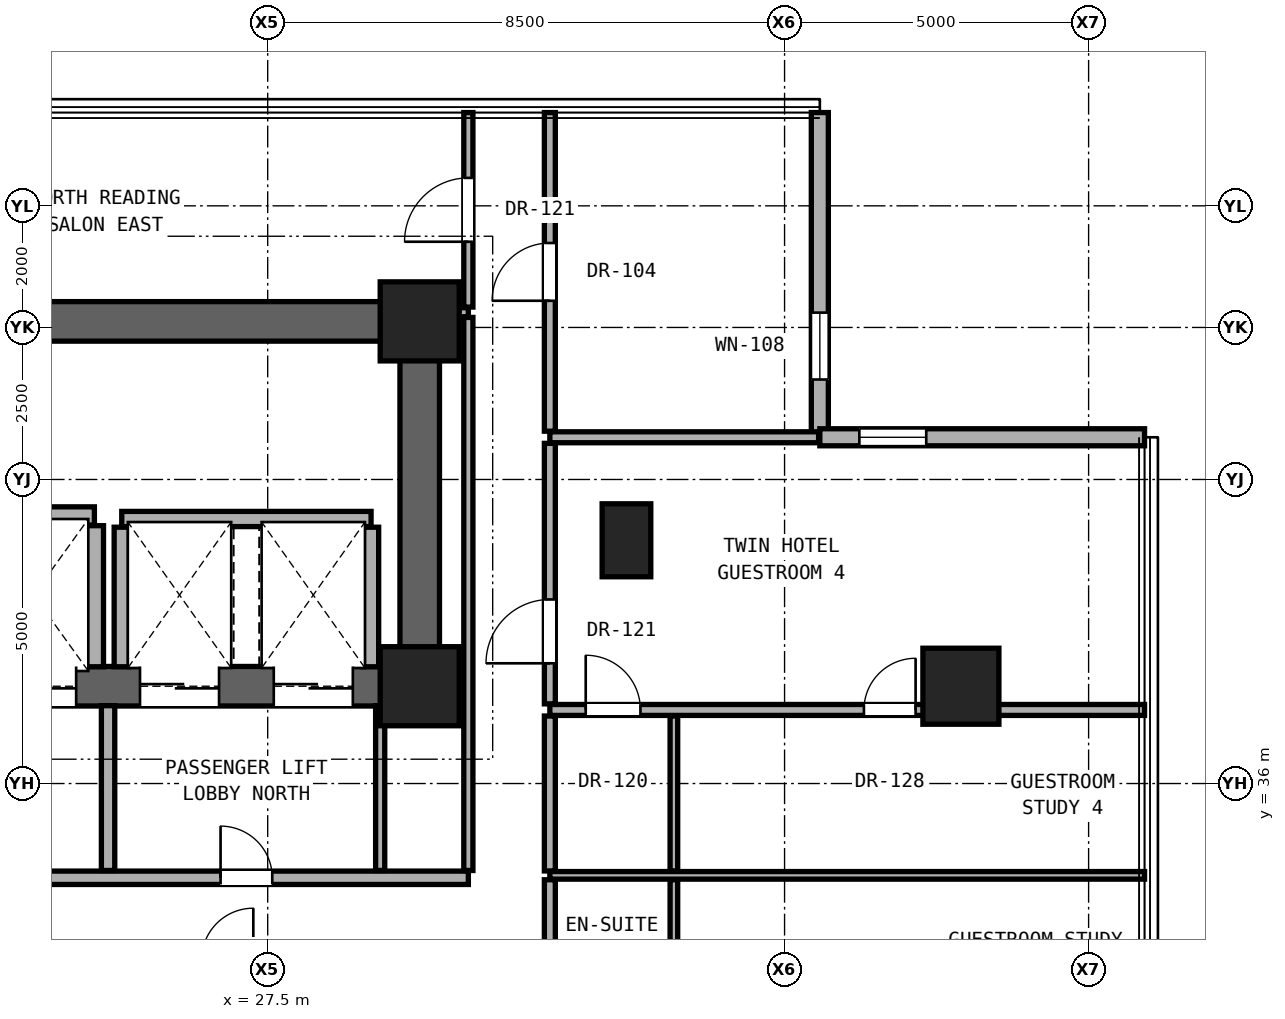
"""IFC4 building model, lengths in metres.
Left out: names, types, materials, properties, quantities, classifications, styles, units other than length and angle.
Written with IfcOpenShell. Run it as: python <this file> out.ifc"""

import sys

from ifc_helpers import new_model, si_unit, direction, frame, frame_2d, origin, origin_2d, place, context, subcontext, project, spatial, rectangle, hollow_rectangle, extrude, element, fill, save


model = new_model("IFC4")
c1 = context("Model", 3, precision=1e-05, world=origin(), true_north=direction((0.0, 1.0)))
c2 = subcontext(c1, "Body", "Model", "MODEL_VIEW")
j1 = project(units=[si_unit("LENGTHUNIT", "METRE"), si_unit("PLANEANGLEUNIT", "RADIAN")], contexts=[c1])
p1 = place(None, origin())
s1 = spatial("IfcSite", under=j1, at=p1, CompositionType="ELEMENT")
p2 = place(p1, origin())
s2 = spatial("IfcBuilding", under=s1, at=p2, CompositionType="ELEMENT")
p3 = place(p2, frame((0.0, 0.0, 62.0)))
s3 = spatial("IfcBuildingStorey", under=s2, at=p3, CompositionType="ELEMENT", Elevation=62.0)
for number, where, z_axis, x_axis in (
    (1, (30.0, 37.6, 0.0), (0.0, 0.0, 1.0), (1.0, 0.0, 0.0)),
    (2, (30.0, 43.6, 0.0), (0.0, 0.0, 1.0), (1.0, 0.0, 0.0)),
):
    element("IfcColumn", number, at=place(p3, frame(where, z_axis=z_axis, x_axis=x_axis)), inside=s3, PredefinedType="COLUMN", context=c2, shape_type="SweptSolid", body=[
        extrude(rectangle(XDim=1.3, YDim=1.3, at=origin_2d()), origin(), (0.0, 0.0, 1.0), 3.3),
    ])
p4 = place(p3, frame((38.9, 37.6, 0.0), z_axis=(0.0, 0.0, 1.0), x_axis=(1.0, 0.0, 0.0)))
e3 = element("IfcColumn", 3, at=p4, inside=s3, PredefinedType="COLUMN", context=c2, shape_type="SweptSolid", body=[
    extrude(hollow_rectangle(XDim=1.25, YDim=1.25, WallThickness=0.07, at=origin_2d()), origin(), (0.0, 0.0, 1.0), 3.3),
])
p5 = place(p3, frame((33.4, 40.0, 0.0), z_axis=(0.0, 0.0, 1.0), x_axis=(1.0, 0.0, 0.0)))
e4 = element("IfcColumn", 4, at=p5, inside=s3, PredefinedType="PILASTER", context=c2, shape_type="SweptSolid", body=[
    extrude(rectangle(XDim=0.8, YDim=1.2, at=origin_2d()), origin(), (0.0, 0.0, 1.0), 3.3),
])
p6 = place(p3, frame((11.0, 43.6, 0.0), z_axis=(0.0, 0.0, 1.0), x_axis=(1.0, 0.0, 0.0)))
e5 = element("IfcWall", 5, at=p6, inside=s3, PredefinedType="SHEAR", context=c2, shape_type="SweptSolid", body=[
    extrude(rectangle(XDim=19.0, YDim=0.65, at=frame_2d((9.5, 0.0))), origin(), (0.0, 0.0, 1.0), 3.06),
])
p7 = place(p3, frame((30.0, 37.6, 0.0), z_axis=(0.0, 0.0, 1.0), x_axis=(0.0, 1.0, 0.0)))
e6 = element("IfcWall", 6, at=p7, inside=s3, PredefinedType="SHEAR", context=c2, shape_type="SweptSolid", body=[
    extrude(rectangle(XDim=6.0, YDim=0.65, at=frame_2d((3.0, 0.0))), origin(), (0.0, 0.0, 1.0), 3.06),
])
p8 = place(p3, frame((11.0, 37.6, 0.0), z_axis=(0.0, 0.0, 1.0), x_axis=(1.0, 0.0, 0.0)))
e7 = element("IfcWall", 7, at=p8, inside=s3, PredefinedType="SHEAR", context=c2, shape_type="SweptSolid", body=[
    extrude(rectangle(XDim=19.0, YDim=0.65, at=frame_2d((9.5, 0.0))), origin(), (0.0, 0.0, 1.0), 3.06),
])
p9 = place(p8, frame((1.06, 0.0, 0.0)))
e8 = element("IfcOpeningElement", 8, at=p9, cuts=e7, PredefinedType="OPENING", context=c2, shape_type="SweptSolid", body=[
    extrude(rectangle(XDim=1.15, YDim=2.2, at=frame_2d((0.575, 1.1))), frame((0.0, 0.335, 0.0), z_axis=(0.0, -1.0, 0.0), x_axis=(1.0, 0.0, 0.0)), (0.0, 0.0, 1.0), 0.67),
])
p10 = place(p8, frame((9.55, 0.0, 0.0)))
e9 = element("IfcOpeningElement", 9, at=p10, cuts=e7, PredefinedType="OPENING", context=c2, shape_type="SweptSolid", body=[
    extrude(rectangle(XDim=1.4, YDim=2.35, at=frame_2d((0.7, 1.175))), frame((0.0, 0.335, 0.0), z_axis=(0.0, -1.0, 0.0), x_axis=(1.0, 0.0, 0.0)), (0.0, 0.0, 1.0), 0.67),
])
p11 = place(p8, frame((11.95, 0.0, 0.0)))
e10 = element("IfcOpeningElement", 10, at=p11, cuts=e7, PredefinedType="OPENING", context=c2, shape_type="SweptSolid", body=[
    extrude(rectangle(XDim=1.4, YDim=2.35, at=frame_2d((0.7, 1.175))), frame((0.0, 0.335, 0.0), z_axis=(0.0, -1.0, 0.0), x_axis=(1.0, 0.0, 0.0)), (0.0, 0.0, 1.0), 0.67),
])
p12 = place(p8, frame((14.4, 0.0, 0.0)))
e11 = element("IfcOpeningElement", 11, at=p12, cuts=e7, PredefinedType="OPENING", context=c2, shape_type="SweptSolid", body=[
    extrude(rectangle(XDim=1.3, YDim=2.3, at=frame_2d((0.65, 1.15))), frame((0.0, 0.335, 0.0), z_axis=(0.0, -1.0, 0.0), x_axis=(1.0, 0.0, 0.0)), (0.0, 0.0, 1.0), 0.67),
])
p13 = place(p8, frame((16.6, 0.0, 0.0)))
e12 = element("IfcOpeningElement", 12, at=p13, cuts=e7, PredefinedType="OPENING", context=c2, shape_type="SweptSolid", body=[
    extrude(rectangle(XDim=1.3, YDim=2.3, at=frame_2d((0.65, 1.15))), frame((0.0, 0.335, 0.0), z_axis=(0.0, -1.0, 0.0), x_axis=(1.0, 0.0, 0.0)), (0.0, 0.0, 1.0), 0.67),
])
p14 = place(p3, frame((36.58, 41.694, 0.0), z_axis=(0.0, 0.0, 1.0), x_axis=(0.0, 1.0, 0.0)))
e13 = element("IfcWall", 13, at=p14, inside=s3, PredefinedType="SOLIDWALL", context=c2, shape_type="SweptSolid", body=[
    extrude(rectangle(XDim=5.34, YDim=0.28, at=frame_2d((2.67, 0.0))), origin(), (0.0, 0.0, 1.0), 3.04),
])
p15 = place(p14, frame((0.95, 0.0, 0.85)))
e14 = element("IfcOpeningElement", 14, at=p15, cuts=e13, PredefinedType="OPENING", context=c2, shape_type="SweptSolid", body=[
    extrude(rectangle(XDim=1.1, YDim=2.0, at=frame_2d((0.55, 1.0))), frame((0.0, 0.15, 0.0), z_axis=(0.0, -1.0, 0.0), x_axis=(1.0, 0.0, 0.0)), (0.0, 0.0, 1.0), 0.3),
])
p16 = place(p3, frame((41.92, 41.694, 0.0), z_axis=(0.0, 0.0, 1.0), x_axis=(-1.0, 0.0, 0.0)))
e15 = element("IfcWall", 15, at=p16, inside=s3, PredefinedType="SOLIDWALL", context=c2, shape_type="SweptSolid", body=[
    extrude(rectangle(XDim=5.34, YDim=0.28, at=frame_2d((2.67, 0.0))), origin(), (0.0, 0.0, 1.0), 3.04),
])
p17 = place(p16, frame((3.59, 0.0, 0.85)))
e16 = element("IfcOpeningElement", 16, at=p17, cuts=e15, PredefinedType="OPENING", context=c2, shape_type="SweptSolid", body=[
    extrude(rectangle(XDim=1.1, YDim=2.0, at=frame_2d((0.55, 1.0))), frame((0.0, 0.15, 0.0), z_axis=(0.0, -1.0, 0.0), x_axis=(1.0, 0.0, 0.0)), (0.0, 0.0, 1.0), 0.3),
])
p18 = place(p3, frame((15.59, 34.45, 0.0), z_axis=(0.0, 0.0, 1.0), x_axis=(1.0, 0.0, 0.0)))
e17 = element("IfcWall", 17, at=p18, inside=s3, PredefinedType="SOLIDWALL", context=c2, shape_type="SweptSolid", body=[
    extrude(rectangle(XDim=15.21, YDim=0.22, at=frame_2d((7.605, 0.0))), origin(), (0.0, 0.0, 1.0), 2.104),
])
p19 = place(p18, frame((6.435, 0.0, 0.0)))
e18 = element("IfcOpeningElement", 18, at=p19, cuts=e17, PredefinedType="OPENING", context=c2, shape_type="SweptSolid", body=[
    extrude(rectangle(XDim=0.85, YDim=2.01, at=frame_2d((0.425, 1.005))), frame((0.0, 0.12, 0.0), z_axis=(0.0, -1.0, 0.0), x_axis=(1.0, 0.0, 0.0)), (0.0, 0.0, 1.0), 0.24),
])
p20 = place(p18, frame((11.135, 0.0, 0.0)))
e19 = element("IfcOpeningElement", 19, at=p20, cuts=e17, PredefinedType="OPENING", context=c2, shape_type="SweptSolid", body=[
    extrude(rectangle(XDim=0.85, YDim=2.01, at=frame_2d((0.425, 1.005))), frame((0.0, 0.12, 0.0), z_axis=(0.0, -1.0, 0.0), x_axis=(1.0, 0.0, 0.0)), (0.0, 0.0, 1.0), 0.24),
])
p21 = place(p18, frame((1.775, 0.0, 0.0)))
e20 = element("IfcOpeningElement", 20, at=p21, cuts=e17, PredefinedType="OPENING", context=c2, shape_type="SweptSolid", body=[
    extrude(rectangle(XDim=0.85, YDim=2.01, at=frame_2d((0.425, 1.005))), frame((0.0, 0.12, 0.0), z_axis=(0.0, -1.0, 0.0), x_axis=(1.0, 0.0, 0.0)), (0.0, 0.0, 1.0), 0.24),
])
p22 = place(p3, frame((32.14, 34.49, 0.0), z_axis=(0.0, 0.0, 1.0), x_axis=(1.0, 0.0, 0.0)))
e21 = element("IfcWall", 21, at=p22, inside=s3, PredefinedType="PARTITIONING", context=c2, shape_type="SweptSolid", body=[
    extrude(rectangle(XDim=9.78, YDim=0.125, at=frame_2d((4.89, 0.0))), origin(), (0.0, 0.0, 1.0), 2.125),
])
p23 = place(p3, frame((32.14, 37.21, 0.0), z_axis=(0.0, 0.0, 1.0), x_axis=(1.0, 0.0, 0.0)))
e22 = element("IfcWall", 22, at=p23, inside=s3, PredefinedType="PARTITIONING", context=c2, shape_type="SweptSolid", body=[
    extrude(rectangle(XDim=9.78, YDim=0.18, at=frame_2d((4.89, 0.0))), origin(), (0.0, 0.0, 1.0), 2.125),
])
p24 = place(p23, frame((5.165, 0.0, 0.0)))
e23 = element("IfcOpeningElement", 23, at=p24, cuts=e22, PredefinedType="OPENING", context=c2, shape_type="SweptSolid", body=[
    extrude(rectangle(XDim=0.85, YDim=2.01, at=frame_2d((0.425, 1.005))), frame((0.0, 0.1, 0.0), z_axis=(0.0, -1.0, 0.0), x_axis=(1.0, 0.0, 0.0)), (0.0, 0.0, 1.0), 0.2),
])
p25 = place(p23, frame((0.59, 0.0, 0.0)))
e24 = element("IfcOpeningElement", 24, at=p25, cuts=e22, PredefinedType="OPENING", context=c2, shape_type="SweptSolid", body=[
    extrude(rectangle(XDim=0.9, YDim=2.1, at=frame_2d((0.45, 1.05))), frame((0.0, 0.1, 0.0), z_axis=(0.0, -1.0, 0.0), x_axis=(1.0, 0.0, 0.0)), (0.0, 0.0, 1.0), 0.2),
])
p26 = place(p3, frame((25.1, 40.35, 0.0), z_axis=(0.0, 0.0, 1.0), x_axis=(1.0, 0.0, 0.0)))
e25 = element("IfcWall", 25, at=p26, inside=s3, PredefinedType="SOLIDWALL", context=c2, shape_type="SweptSolid", body=[
    extrude(rectangle(XDim=4.1, YDim=0.25, at=frame_2d((2.05, 0.0))), origin(), (0.0, 0.0, 1.0), 3.06),
])
p27 = place(p3, frame((20.25, 40.4, 0.0), z_axis=(0.0, 0.0, 1.0), x_axis=(1.0, 0.0, 0.0)))
e26 = element("IfcWall", 26, at=p27, inside=s3, PredefinedType="SOLIDWALL", context=c2, shape_type="SweptSolid", body=[
    extrude(rectangle(XDim=4.4, YDim=0.3, at=frame_2d((2.2, 0.0))), origin(), (0.0, 0.0, 1.0), 3.06),
])
p28 = place(p3, frame((32.14, 41.694, 0.0), z_axis=(0.0, 0.0, 1.0), x_axis=(1.0, 0.0, 0.0)))
e27 = element("IfcWall", 27, at=p28, inside=s3, PredefinedType="PARTITIONING", context=c2, shape_type="SweptSolid", body=[
    extrude(rectangle(XDim=4.42, YDim=0.18, at=frame_2d((2.21, 0.0))), origin(), (0.0, 0.0, 1.0), 3.06),
])
p29 = place(p3, frame((30.32, 43.75, 0.0), z_axis=(0.0, 0.0, 1.0), x_axis=(1.0, 0.0, 0.0)))
e28 = element("IfcWall", 28, at=p29, inside=s3, PredefinedType="PARTITIONING", context=c2, shape_type="SweptSolid", body=[
    extrude(rectangle(XDim=0.48, YDim=0.15, at=frame_2d((0.24, 0.0))), origin(), (0.0, 0.0, 1.0), 3.06),
])
p30 = place(p3, frame((24.65, 37.92, 0.0), z_axis=(0.0, 0.0, 1.0), x_axis=(0.0, 1.0, 0.0)))
e29 = element("IfcWall", 29, at=p30, inside=s3, PredefinedType="SOLIDWALL", context=c2, shape_type="SweptSolid", body=[
    extrude(rectangle(XDim=2.32, YDim=0.3, at=frame_2d((1.16, 0.0))), origin(), (0.0, 0.0, 1.0), 3.06),
])
p31 = place(p3, frame((24.875, 34.57, 0.0), z_axis=(0.0, 0.0, 1.0), x_axis=(0.0, 1.0, 0.0)))
e30 = element("IfcWall", 30, at=p31, inside=s3, PredefinedType="SOLIDWALL", context=c2, shape_type="SweptSolid", body=[
    extrude(rectangle(XDim=2.71, YDim=0.22, at=frame_2d((1.355, 0.0))), origin(), (0.0, 0.0, 1.0), 3.06),
])
p32 = place(p3, frame((25.1, 37.92, 0.0), z_axis=(0.0, 0.0, 1.0), x_axis=(0.0, 1.0, 0.0)))
e31 = element("IfcWall", 31, at=p32, inside=s3, PredefinedType="SOLIDWALL", context=c2, shape_type="SweptSolid", body=[
    extrude(rectangle(XDim=2.295, YDim=0.25, at=frame_2d((1.147, 0.0))), origin(), (0.0, 0.0, 1.0), 3.06),
])
p33 = place(p3, frame((29.35, 34.57, 0.0), z_axis=(0.0, 0.0, 1.0), x_axis=(0.0, 1.0, 0.0)))
e32 = element("IfcWall", 32, at=p33, inside=s3, PredefinedType="PARTITIONING", context=c2, shape_type="SweptSolid", body=[
    extrude(rectangle(XDim=2.71, YDim=0.15, at=frame_2d((1.355, 0.0))), origin(), (0.0, 0.0, 1.0), 3.06),
])
p34 = place(p3, frame((29.2, 37.92, 0.0), z_axis=(0.0, 0.0, 1.0), x_axis=(0.0, 1.0, 0.0)))
e33 = element("IfcWall", 33, at=p34, inside=s3, PredefinedType="SOLIDWALL", context=c2, shape_type="SweptSolid", body=[
    extrude(rectangle(XDim=2.295, YDim=0.25, at=frame_2d((1.147, 0.0))), origin(), (0.0, 0.0, 1.0), 3.06),
])
p35 = place(p3, frame((30.8, 34.57, 0.0), z_axis=(0.0, 0.0, 1.0), x_axis=(0.0, 1.0, 0.0)))
e34 = element("IfcWall", 34, at=p35, inside=s3, PredefinedType="PARTITIONING", context=c2, shape_type="SweptSolid", body=[
    extrude(rectangle(XDim=9.095, YDim=0.15, at=frame_2d((4.547, 0.0))), origin(), (0.0, 0.0, 1.0), 2.436),
])
p36 = place(p3, frame((30.8, 43.835, 0.0), z_axis=(0.0, 0.0, 1.0), x_axis=(0.0, 1.0, 0.0)))
e35 = element("IfcWall", 35, at=p36, inside=s3, PredefinedType="PARTITIONING", context=c2, shape_type="SweptSolid", body=[
    extrude(rectangle(XDim=3.199, YDim=0.15, at=frame_2d((1.6, 0.0))), origin(), (0.0, 0.0, 1.0), 3.06),
])
p37 = place(p36, frame((1.074, 0.0, 0.0)))
e36 = element("IfcOpeningElement", 36, at=p37, cuts=e35, PredefinedType="OPENING", context=c2, shape_type="SweptSolid", body=[
    extrude(rectangle(XDim=1.05, YDim=2.2, at=frame_2d((0.525, 1.1))), frame((0.0, 0.085, 0.0), z_axis=(0.0, -1.0, 0.0), x_axis=(1.0, 0.0, 0.0)), (0.0, 0.0, 1.0), 0.17),
])
p38 = place(p3, frame((32.14, 31.87, 0.0), z_axis=(0.0, 0.0, 1.0), x_axis=(0.0, 1.0, 0.0)))
e37 = element("IfcWall", 37, at=p38, inside=s3, PredefinedType="PARTITIONING", context=c2, shape_type="SweptSolid", body=[
    extrude(rectangle(XDim=2.547, YDim=0.18, at=frame_2d((1.274, 0.0))), origin(), (0.0, 0.0, 1.0), 3.06),
])
p39 = place(p3, frame((32.14, 34.562, 0.0), z_axis=(0.0, 0.0, 1.0), x_axis=(0.0, 1.0, 0.0)))
e38 = element("IfcWall", 38, at=p39, inside=s3, PredefinedType="PARTITIONING", context=c2, shape_type="SweptSolid", body=[
    extrude(rectangle(XDim=2.548, YDim=0.18, at=frame_2d((1.274, 0.0))), origin(), (0.0, 0.0, 1.0), 3.06),
])
p40 = place(p3, frame((32.14, 37.31, 0.0), z_axis=(0.0, 0.0, 1.0), x_axis=(0.0, 1.0, 0.0)))
e39 = element("IfcWall", 39, at=p40, inside=s3, PredefinedType="PARTITIONING", context=c2, shape_type="SweptSolid", body=[
    extrude(rectangle(XDim=4.284, YDim=0.18, at=frame_2d((2.142, 0.0))), origin(), (0.0, 0.0, 1.0), 2.436),
])
p41 = place(p40, frame((0.667, 0.0, 0.0)))
e40 = element("IfcOpeningElement", 40, at=p41, cuts=e39, PredefinedType="OPENING", context=c2, shape_type="SweptSolid", body=[
    extrude(rectangle(XDim=1.05, YDim=2.2, at=frame_2d((0.525, 1.1))), frame((0.0, 0.1, 0.0), z_axis=(0.0, -1.0, 0.0), x_axis=(1.0, 0.0, 0.0)), (0.0, 0.0, 1.0), 0.2),
])
p42 = place(p3, frame((32.14, 41.794, 0.0), z_axis=(0.0, 0.0, 1.0), x_axis=(0.0, 1.0, 0.0)))
e41 = element("IfcWall", 41, at=p42, inside=s3, PredefinedType="PARTITIONING", context=c2, shape_type="SweptSolid", body=[
    extrude(rectangle(XDim=5.24, YDim=0.18, at=frame_2d((2.62, 0.0))), origin(), (0.0, 0.0, 1.0), 3.06),
])
p43 = place(p42, frame((2.145, 0.0, 0.0)))
e42 = element("IfcOpeningElement", 42, at=p43, cuts=e41, PredefinedType="OPENING", context=c2, shape_type="SweptSolid", body=[
    extrude(rectangle(XDim=0.95, YDim=2.15, at=frame_2d((0.475, 1.075))), frame((0.0, 0.1, 0.0), z_axis=(0.0, -1.0, 0.0), x_axis=(1.0, 0.0, 0.0)), (0.0, 0.0, 1.0), 0.2),
])
p44 = place(p3, frame((34.18, 31.87, 0.0), z_axis=(0.0, 0.0, 1.0), x_axis=(0.0, 1.0, 0.0)))
e43 = element("IfcWall", 43, at=p44, inside=s3, PredefinedType="PARTITIONING", context=c2, shape_type="SweptSolid", body=[
    extrude(rectangle(XDim=2.547, YDim=0.125, at=frame_2d((1.274, 0.0))), origin(), (0.0, 0.0, 1.0), 3.06),
])
p45 = place(p3, frame((34.18, 34.562, 0.0), z_axis=(0.0, 0.0, 1.0), x_axis=(0.0, 1.0, 0.0)))
e44 = element("IfcWall", 44, at=p45, inside=s3, PredefinedType="PARTITIONING", context=c2, shape_type="SweptSolid", body=[
    extrude(rectangle(XDim=2.548, YDim=0.125, at=frame_2d((1.274, 0.0))), origin(), (0.0, 0.0, 1.0), 3.06),
])
p46 = place(p15, origin())
e45 = element("IfcWindow", 45, at=p46, inside=s3, PartitioningType="SINGLE_PANEL", PredefinedType="WINDOW", context=c2, shape_type="SweptSolid", body=[
    extrude(rectangle(XDim=1.1, YDim=2.0, at=frame_2d((0.55, 1.0))), frame((0.0, 0.03, 0.0), z_axis=(0.0, -1.0, 0.0), x_axis=(1.0, 0.0, 0.0)), (0.0, 0.0, 1.0), 0.06),
])
fill(e14, e45)
p47 = place(p17, origin())
e46 = element("IfcWindow", 46, at=p47, inside=s3, PartitioningType="SINGLE_PANEL", PredefinedType="WINDOW", context=c2, shape_type="SweptSolid", body=[
    extrude(rectangle(XDim=1.1, YDim=2.0, at=frame_2d((0.55, 1.0))), frame((0.0, 0.03, 0.0), z_axis=(0.0, -1.0, 0.0), x_axis=(1.0, 0.0, 0.0)), (0.0, 0.0, 1.0), 0.06),
])
fill(e16, e46)
p48 = place(p20, origin())
e47 = element("IfcDoor", 47, at=p48, inside=s3, OperationType="SINGLE_SWING_LEFT", PredefinedType="DOOR", context=c2, shape_type="SweptSolid", body=[
    extrude(rectangle(XDim=0.85, YDim=2.01, at=frame_2d((0.425, 1.005))), frame((0.0, 0.025, 0.0), z_axis=(0.0, -1.0, 0.0), x_axis=(1.0, 0.0, 0.0)), (0.0, 0.0, 1.0), 0.05),
])
fill(e19, e47)
p49 = place(p41, origin())
e48 = element("IfcDoor", 48, at=p49, inside=s3, OperationType="SINGLE_SWING_LEFT", PredefinedType="DOOR", context=c2, shape_type="SweptSolid", body=[
    extrude(rectangle(XDim=1.05, YDim=2.2, at=frame_2d((0.525, 1.1))), frame((0.0, 0.025, 0.0), z_axis=(0.0, -1.0, 0.0), x_axis=(1.0, 0.0, 0.0)), (0.0, 0.0, 1.0), 0.05),
])
fill(e40, e48)
p50 = place(p24, origin())
e49 = element("IfcDoor", 49, at=p50, inside=s3, OperationType="SINGLE_SWING_RIGHT", PredefinedType="DOOR", context=c2, shape_type="SweptSolid", body=[
    extrude(rectangle(XDim=0.85, YDim=2.01, at=frame_2d((0.425, 1.005))), frame((0.0, 0.025, 0.0), z_axis=(0.0, -1.0, 0.0), x_axis=(1.0, 0.0, 0.0)), (0.0, 0.0, 1.0), 0.05),
])
fill(e23, e49)
p51 = place(p25, origin())
e50 = element("IfcDoor", 50, at=p51, inside=s3, OperationType="SINGLE_SWING_LEFT", PredefinedType="DOOR", context=c2, shape_type="SweptSolid", body=[
    extrude(rectangle(XDim=0.9, YDim=2.1, at=frame_2d((0.45, 1.05))), frame((0.0, 0.025, 0.0), z_axis=(0.0, -1.0, 0.0), x_axis=(1.0, 0.0, 0.0)), (0.0, 0.0, 1.0), 0.05),
])
fill(e24, e50)
p52 = place(p37, origin())
e51 = element("IfcDoor", 51, at=p52, inside=s3, OperationType="SINGLE_SWING_LEFT", PredefinedType="DOOR", context=c2, shape_type="SweptSolid", body=[
    extrude(rectangle(XDim=1.05, YDim=2.2, at=frame_2d((0.525, 1.1))), frame((0.0, 0.025, 0.0), z_axis=(0.0, -1.0, 0.0), x_axis=(1.0, 0.0, 0.0)), (0.0, 0.0, 1.0), 0.05),
])
fill(e36, e51)
p53 = place(p43, origin())
e52 = element("IfcDoor", 52, at=p53, inside=s3, OperationType="SINGLE_SWING_LEFT", PredefinedType="DOOR", context=c2, shape_type="SweptSolid", body=[
    extrude(rectangle(XDim=0.95, YDim=2.15, at=frame_2d((0.475, 1.075))), frame((0.0, 0.025, 0.0), z_axis=(0.0, -1.0, 0.0), x_axis=(1.0, 0.0, 0.0)), (0.0, 0.0, 1.0), 0.05),
])
fill(e42, e52)
p54 = place(p11, origin())
e53 = element("IfcDoor", 53, at=p54, inside=s3, OperationType="DOUBLE_DOOR_SLIDING", PredefinedType="DOOR", context=c2, shape_type="SweptSolid", body=[
    extrude(rectangle(XDim=1.4, YDim=2.35, at=frame_2d((0.7, 1.175))), frame((0.0, 0.025, 0.0), z_axis=(0.0, -1.0, 0.0), x_axis=(1.0, 0.0, 0.0)), (0.0, 0.0, 1.0), 0.05),
])
fill(e10, e53)
p55 = place(p12, origin())
e54 = element("IfcDoor", 54, at=p55, inside=s3, OperationType="DOUBLE_DOOR_SLIDING", PredefinedType="DOOR", context=c2, shape_type="SweptSolid", body=[
    extrude(rectangle(XDim=1.3, YDim=2.3, at=frame_2d((0.65, 1.15))), frame((0.0, 0.025, 0.0), z_axis=(0.0, -1.0, 0.0), x_axis=(1.0, 0.0, 0.0)), (0.0, 0.0, 1.0), 0.05),
])
fill(e11, e54)
p56 = place(p13, origin())
e55 = element("IfcDoor", 55, at=p56, inside=s3, OperationType="DOUBLE_DOOR_SLIDING", PredefinedType="DOOR", context=c2, shape_type="SweptSolid", body=[
    extrude(rectangle(XDim=1.3, YDim=2.3, at=frame_2d((0.65, 1.15))), frame((0.0, 0.025, 0.0), z_axis=(0.0, -1.0, 0.0), x_axis=(1.0, 0.0, 0.0)), (0.0, 0.0, 1.0), 0.05),
])
fill(e12, e55)
save(model, sys.argv[1])
